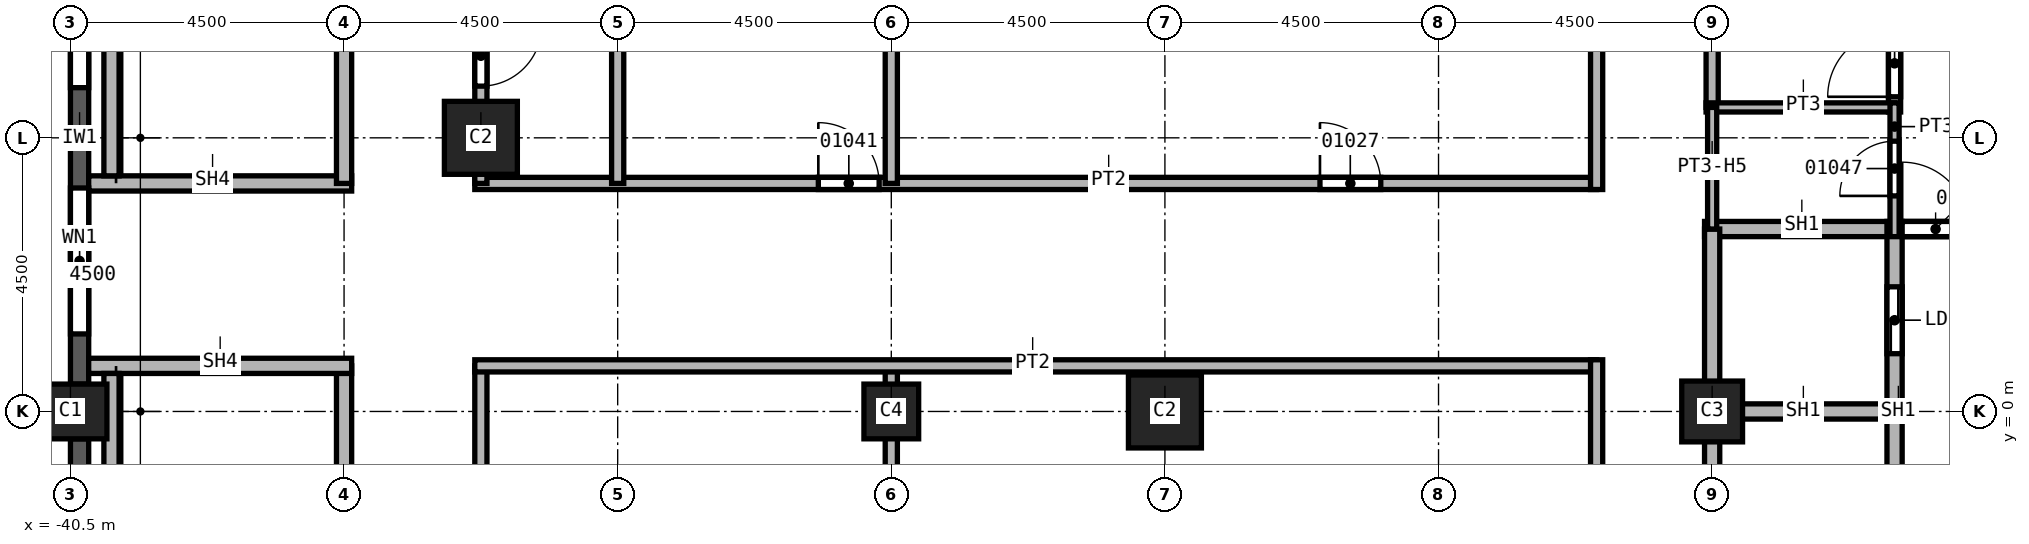
"""IFC4 building model, lengths in metres.
Left out: names, types, materials, properties, quantities, classifications, styles, units other than length and angle.
Written with IfcOpenShell. Run it as: python <this file> out.ifc"""

import sys

from ifc_helpers import new_model, si_unit, direction, frame, frame_2d, origin, origin_2d, place, context, subcontext, project, spatial, rectangle, extrude, element, fill, save


model = new_model("IFC4")
c1 = context("Model", 3, precision=1e-05, world=origin(), true_north=direction((0.0, 1.0)))
c2 = subcontext(c1, "Body", "Model", "MODEL_VIEW")
j1 = project(units=[si_unit("LENGTHUNIT", "METRE"), si_unit("PLANEANGLEUNIT", "RADIAN")], contexts=[c1])
p1 = place(None, origin())
s1 = spatial("IfcSite", under=j1, at=p1, CompositionType="ELEMENT")
p2 = place(p1, origin())
s2 = spatial("IfcBuilding", under=s1, at=p2, CompositionType="ELEMENT")
p3 = place(p2, frame((0.0, 0.0, 72.0)))
s3 = spatial("IfcBuildingStorey", under=s2, at=p3, CompositionType="ELEMENT", Elevation=72.0)
p4 = place(p3, frame((-40.5, 0.0, 0.0), z_axis=(0.0, 0.0, 1.0), x_axis=(0.0, 1.0, 0.0)))
e1 = element("IfcColumn", 1, at=p4, inside=s3, PredefinedType="COLUMN", context=c2, shape_type="SweptSolid", body=[
    extrude(rectangle(XDim=0.9, YDim=1.2, at=origin_2d()), origin(), (0.0, 0.0, 1.0), 3.7),
])
for number, where, z_axis, x_axis in (
    (2, (-33.75, 4.5, 0.0), (0.0, 0.0, 1.0), (1.0, 0.0, 0.0)),
    (3, (-22.5, 0.0, 0.0), (0.0, 0.0, 1.0), (1.0, 0.0, 0.0)),
):
    element("IfcColumn", number, at=place(p3, frame(where, z_axis=z_axis, x_axis=x_axis)), inside=s3, PredefinedType="COLUMN", context=c2, shape_type="SweptSolid", body=[
        extrude(rectangle(XDim=1.2, YDim=1.2, at=origin_2d()), origin(), (0.0, 0.0, 1.0), 3.7),
    ])
p5 = place(p3, frame((-13.5, 0.0, 0.0), z_axis=(0.0, 0.0, 1.0), x_axis=(1.0, 0.0, 0.0)))
e4 = element("IfcColumn", 4, at=p5, inside=s3, PredefinedType="COLUMN", context=c2, shape_type="SweptSolid", body=[
    extrude(rectangle(XDim=1.0, YDim=1.0, at=origin_2d()), origin(), (0.0, 0.0, 1.0), 3.7),
])
p6 = place(p3, frame((-27.0, 0.0, 0.0), z_axis=(0.0, 0.0, 1.0), x_axis=(1.0, 0.0, 0.0)))
e5 = element("IfcColumn", 5, at=p6, inside=s3, PredefinedType="COLUMN", context=c2, shape_type="SweptSolid", body=[
    extrude(rectangle(XDim=0.9, YDim=0.9, at=origin_2d()), origin(), (0.0, 0.0, 1.0), 3.7),
])
p7 = place(p3, frame((-40.35, 8.55, 0.0), z_axis=(0.0, 0.0, 1.0), x_axis=(0.0, -1.0, 0.0)))
e6 = element("IfcWall", 6, at=p7, inside=s3, PredefinedType="SOLIDWALL", context=c2, shape_type="SweptSolid", body=[
    extrude(rectangle(XDim=8.1, YDim=0.3, at=frame_2d((4.05, 0.0))), origin(), (0.0, 0.0, 1.0), 3.1),
])
p8 = place(p7, frame((0.825, 0.0, 0.8)))
e7 = element("IfcOpeningElement", 7, at=p8, cuts=e6, PredefinedType="OPENING", context=c2, shape_type="SweptSolid", body=[
    extrude(rectangle(XDim=2.4, YDim=1.95, at=frame_2d((1.2, 0.975))), frame((0.0, 0.15, 0.0), z_axis=(0.0, -1.0, 0.0), x_axis=(1.0, 0.0, 0.0)), (0.0, 0.0, 1.0), 0.3),
])
p9 = place(p7, frame((4.875, 0.0, 0.8)))
e8 = element("IfcOpeningElement", 8, at=p9, cuts=e6, PredefinedType="OPENING", context=c2, shape_type="SweptSolid", body=[
    extrude(rectangle(XDim=2.4, YDim=1.95, at=frame_2d((1.2, 0.975))), frame((0.0, 0.15, 0.0), z_axis=(0.0, -1.0, 0.0), x_axis=(1.0, 0.0, 0.0)), (0.0, 0.0, 1.0), 0.3),
])
p10 = place(p3, frame((-40.35, -0.45, 0.0), z_axis=(0.0, 0.0, 1.0), x_axis=(0.0, -1.0, 0.0)))
e9 = element("IfcWall", 9, at=p10, inside=s3, PredefinedType="SOLIDWALL", context=c2, shape_type="SweptSolid", body=[
    extrude(rectangle(XDim=8.1, YDim=0.3, at=frame_2d((4.05, 0.0))), origin(), (0.0, 0.0, 1.0), 3.1),
])
p11 = place(p10, frame((0.825, 0.0, 0.8)))
e10 = element("IfcOpeningElement", 10, at=p11, cuts=e9, PredefinedType="OPENING", context=c2, shape_type="SweptSolid", body=[
    extrude(rectangle(XDim=2.4, YDim=1.95, at=frame_2d((1.2, 0.975))), frame((0.0, 0.15, 0.0), z_axis=(0.0, -1.0, 0.0), x_axis=(1.0, 0.0, 0.0)), (0.0, 0.0, 1.0), 0.3),
])
p12 = place(p10, frame((4.975, 0.0, 0.8)))
e11 = element("IfcOpeningElement", 11, at=p12, cuts=e9, PredefinedType="OPENING", context=c2, shape_type="SweptSolid", body=[
    extrude(rectangle(XDim=1.0, YDim=1.95, at=frame_2d((0.5, 0.975))), frame((0.0, 0.15, 0.0), z_axis=(0.0, -1.0, 0.0), x_axis=(1.0, 0.0, 0.0)), (0.0, 0.0, 1.0), 0.3),
])
p13 = place(p10, frame((6.6, 0.0, 0.8)))
e12 = element("IfcOpeningElement", 12, at=p13, cuts=e9, PredefinedType="OPENING", context=c2, shape_type="SweptSolid", body=[
    extrude(rectangle(XDim=0.6, YDim=1.95, at=frame_2d((0.3, 0.975))), frame((0.0, 0.15, 0.0), z_axis=(0.0, -1.0, 0.0), x_axis=(1.0, 0.0, 0.0)), (0.0, 0.0, 1.0), 0.3),
])
p14 = place(p3, frame((-33.85, 3.75, 0.0), z_axis=(0.0, 0.0, 1.0), x_axis=(1.0, 0.0, 0.0)))
e13 = element("IfcWall", 13, at=p14, inside=s3, PredefinedType="PARTITIONING", context=c2, shape_type="SweptSolid", body=[
    extrude(rectangle(XDim=18.45, YDim=0.2, at=frame_2d((9.225, 0.0))), origin(), (0.0, 0.0, 1.0), 3.7),
])
p15 = place(p14, frame((13.9, 0.0, 0.0)))
e14 = element("IfcOpeningElement", 14, at=p15, cuts=e13, PredefinedType="OPENING", context=c2, shape_type="SweptSolid", body=[
    extrude(rectangle(XDim=1.0, YDim=2.1, at=frame_2d((0.5, 1.05))), frame((0.0, 0.1, 0.0), z_axis=(0.0, -1.0, 0.0), x_axis=(1.0, 0.0, 0.0)), (0.0, 0.0, 1.0), 0.2),
])
p16 = place(p14, frame((5.65, 0.0, 0.0)))
e15 = element("IfcOpeningElement", 15, at=p16, cuts=e13, PredefinedType="OPENING", context=c2, shape_type="SweptSolid", body=[
    extrude(rectangle(XDim=1.0, YDim=2.1, at=frame_2d((0.5, 1.05))), frame((0.0, 0.1, 0.0), z_axis=(0.0, -1.0, 0.0), x_axis=(1.0, 0.0, 0.0)), (0.0, 0.0, 1.0), 0.2),
])
p17 = place(p3, frame((-33.75, 0.75, 0.0), z_axis=(0.0, 0.0, 1.0), x_axis=(0.0, -1.0, 0.0)))
e16 = element("IfcWall", 16, at=p17, inside=s3, PredefinedType="PARTITIONING", context=c2, shape_type="SweptSolid", body=[
    extrude(rectangle(XDim=18.45, YDim=0.2, at=frame_2d((9.225, 0.0))), origin(), (0.0, 0.0, 1.0), 3.7),
])
p18 = place(p17, frame((3.25, 0.0, 0.0)))
e17 = element("IfcOpeningElement", 17, at=p18, cuts=e16, PredefinedType="OPENING", context=c2, shape_type="SweptSolid", body=[
    extrude(rectangle(XDim=1.0, YDim=2.1, at=frame_2d((0.5, 1.05))), frame((0.0, 0.1, 0.0), z_axis=(0.0, -1.0, 0.0), x_axis=(1.0, 0.0, 0.0)), (0.0, 0.0, 1.0), 0.2),
])
p19 = place(p3, frame((-33.75, 11.25, 0.0), z_axis=(0.0, 0.0, 1.0), x_axis=(0.0, -1.0, 0.0)))
e18 = element("IfcWall", 18, at=p19, inside=s3, PredefinedType="PARTITIONING", context=c2, shape_type="SweptSolid", body=[
    extrude(rectangle(XDim=7.5, YDim=0.2, at=frame_2d((3.75, 0.0))), origin(), (0.0, 0.0, 1.0), 3.7),
])
p20 = place(p19, frame((4.9, 0.0, 0.0)))
e19 = element("IfcOpeningElement", 19, at=p20, cuts=e18, PredefinedType="OPENING", context=c2, shape_type="SweptSolid", body=[
    extrude(rectangle(XDim=1.0, YDim=2.1, at=frame_2d((0.5, 1.05))), frame((0.0, 0.1, 0.0), z_axis=(0.0, -1.0, 0.0), x_axis=(1.0, 0.0, 0.0)), (0.0, 0.0, 1.0), 0.2),
])
p21 = place(p3, frame((-31.5, 17.4, 0.0), z_axis=(0.0, 0.0, 1.0), x_axis=(0.0, -1.0, 0.0)))
e20 = element("IfcWall", 20, at=p21, inside=s3, PredefinedType="PARTITIONING", context=c2, shape_type="SweptSolid", body=[
    extrude(rectangle(XDim=13.65, YDim=0.2, at=frame_2d((6.825, 0.0))), origin(), (0.0, 0.0, 1.0), 3.7),
])
p22 = place(p3, frame((-27.0, -17.4, 0.0), z_axis=(0.0, 0.0, 1.0), x_axis=(0.0, 1.0, 0.0)))
e21 = element("IfcWall", 21, at=p22, inside=s3, PredefinedType="PARTITIONING", context=c2, shape_type="SweptSolid", body=[
    extrude(rectangle(XDim=18.15, YDim=0.2, at=frame_2d((9.075, 0.0))), origin(), (0.0, 0.0, 1.0), 3.7),
])
p23 = place(p3, frame((-27.0, 3.75, 0.0), z_axis=(0.0, 0.0, 1.0), x_axis=(0.0, 1.0, 0.0)))
e22 = element("IfcWall", 22, at=p23, inside=s3, PredefinedType="PARTITIONING", context=c2, shape_type="SweptSolid", body=[
    extrude(rectangle(XDim=13.65, YDim=0.2, at=frame_2d((6.825, 0.0))), origin(), (0.0, 0.0, 1.0), 3.7),
])
p24 = place(p3, frame((-15.4, 0.75, 0.0), z_axis=(0.0, 0.0, 1.0), x_axis=(-1.0, 0.0, 0.0)))
e23 = element("IfcWall", 23, at=p24, inside=s3, PredefinedType="PARTITIONING", context=c2, shape_type="SweptSolid", body=[
    extrude(rectangle(XDim=18.45, YDim=0.2, at=frame_2d((9.225, 0.0))), origin(), (0.0, 0.0, 1.0), 3.7),
])
p25 = place(p3, frame((-15.4, -24.5, 0.0), z_axis=(0.0, 0.0, 1.0), x_axis=(0.0, 1.0, 0.0)))
e24 = element("IfcWall", 24, at=p25, inside=s3, PredefinedType="PARTITIONING", context=c2, shape_type="SweptSolid", body=[
    extrude(rectangle(XDim=25.35, YDim=0.2, at=frame_2d((12.675, 0.0))), origin(), (0.0, 0.0, 1.0), 3.7),
])
p26 = place(p25, frame((1.15, 0.0, 0.0)))
e25 = element("IfcOpeningElement", 25, at=p26, cuts=e24, PredefinedType="OPENING", context=c2, shape_type="SweptSolid", body=[
    extrude(rectangle(XDim=1.0, YDim=2.1, at=frame_2d((0.5, 1.05))), frame((0.0, 0.1, 0.0), z_axis=(0.0, -1.0, 0.0), x_axis=(1.0, 0.0, 0.0)), (0.0, 0.0, 1.0), 0.2),
])
p27 = place(p25, frame((3.4, 0.0, 0.0)))
e26 = element("IfcOpeningElement", 26, at=p27, cuts=e24, PredefinedType="OPENING", context=c2, shape_type="SweptSolid", body=[
    extrude(rectangle(XDim=1.0, YDim=2.1, at=frame_2d((0.5, 1.05))), frame((0.0, 0.1, 0.0), z_axis=(0.0, -1.0, 0.0), x_axis=(1.0, 0.0, 0.0)), (0.0, 0.0, 1.0), 0.2),
])
p28 = place(p25, frame((6.65, 0.0, 0.0)))
e27 = element("IfcOpeningElement", 27, at=p28, cuts=e24, PredefinedType="OPENING", context=c2, shape_type="SweptSolid", body=[
    extrude(rectangle(XDim=1.0, YDim=2.1, at=frame_2d((0.5, 1.05))), frame((0.0, 0.1, 0.0), z_axis=(0.0, -1.0, 0.0), x_axis=(1.0, 0.0, 0.0)), (0.0, 0.0, 1.0), 0.2),
])
p29 = place(p25, frame((14.9, 0.0, 0.0)))
e28 = element("IfcOpeningElement", 28, at=p29, cuts=e24, PredefinedType="OPENING", context=c2, shape_type="SweptSolid", body=[
    extrude(rectangle(XDim=1.0, YDim=2.1, at=frame_2d((0.5, 1.05))), frame((0.0, 0.1, 0.0), z_axis=(0.0, -1.0, 0.0), x_axis=(1.0, 0.0, 0.0)), (0.0, 0.0, 1.0), 0.2),
])
p30 = place(p3, frame((-15.4, 3.65, 0.0), z_axis=(0.0, 0.0, 1.0), x_axis=(0.0, 1.0, 0.0)))
e29 = element("IfcWall", 29, at=p30, inside=s3, PredefinedType="PARTITIONING", context=c2, shape_type="SweptSolid", body=[
    extrude(rectangle(XDim=9.95, YDim=0.2, at=frame_2d((4.975, 0.0))), origin(), (0.0, 0.0, 1.0), 3.7),
])
p31 = place(p3, frame((-13.5, 5.0, 0.0), z_axis=(0.0, 0.0, 1.0), x_axis=(0.0, 1.0, 0.0)))
e30 = element("IfcWall", 30, at=p31, inside=s3, PredefinedType="SOLIDWALL", context=c2, shape_type="SweptSolid", body=[
    extrude(rectangle(XDim=4.1, YDim=0.2, at=frame_2d((2.05, 0.0))), origin(), (0.0, 0.0, 1.0), 2.938),
])
p32 = place(p3, frame((-10.5, 4.925, 0.0), z_axis=(0.0, 0.0, 1.0), x_axis=(0.0, 1.0, 0.0)))
e31 = element("IfcWall", 31, at=p32, inside=s3, PredefinedType="SOLIDWALL", context=c2, shape_type="SweptSolid", body=[
    extrude(rectangle(XDim=4.175, YDim=0.2, at=frame_2d((2.087, 0.0))), origin(), (0.0, 0.0, 1.0), 3.7),
])
p33 = place(p32, frame((0.25, 0.0, 0.0)))
e32 = element("IfcOpeningElement", 32, at=p33, cuts=e31, PredefinedType="OPENING", context=c2, shape_type="SweptSolid", body=[
    extrude(rectangle(XDim=1.1, YDim=2.1, at=frame_2d((0.55, 1.05))), frame((0.0, 0.1, 0.0), z_axis=(0.0, -1.0, 0.0), x_axis=(1.0, 0.0, 0.0)), (0.0, 0.0, 1.0), 0.2),
])
p34 = place(p3, frame((-13.625, 0.0, 0.0), z_axis=(0.0, 0.0, 1.0), x_axis=(1.0, 0.0, 0.0)))
e33 = element("IfcWall", 33, at=p34, inside=s3, PredefinedType="SOLIDWALL", context=c2, shape_type="SweptSolid", body=[
    extrude(rectangle(XDim=3.125, YDim=0.25, at=frame_2d((1.562, 0.0))), origin(), (0.0, 0.0, 1.0), 3.7),
])
p35 = place(p3, frame((-13.625, 3.0, 0.0), z_axis=(0.0, 0.0, 1.0), x_axis=(1.0, 0.0, 0.0)))
e34 = element("IfcWall", 34, at=p35, inside=s3, PredefinedType="SOLIDWALL", context=c2, shape_type="SweptSolid", body=[
    extrude(rectangle(XDim=6.125, YDim=0.25, at=frame_2d((3.062, 0.0))), origin(), (0.0, 0.0, 1.0), 3.7),
])
p36 = place(p35, frame((3.25, 0.0, 0.0)))
e35 = element("IfcOpeningElement", 35, at=p36, cuts=e34, PredefinedType="OPENING", context=c2, shape_type="SweptSolid", body=[
    extrude(rectangle(XDim=1.1, YDim=2.1, at=frame_2d((0.55, 1.05))), frame((0.0, 0.125, 0.0), z_axis=(0.0, -1.0, 0.0), x_axis=(1.0, 0.0, 0.0)), (0.0, 0.0, 1.0), 0.25),
])
p37 = place(p3, frame((-13.5, -3.0, 0.0), z_axis=(0.0, 0.0, 1.0), x_axis=(0.0, 1.0, 0.0)))
e36 = element("IfcWall", 36, at=p37, inside=s3, PredefinedType="SOLIDWALL", context=c2, shape_type="SweptSolid", body=[
    extrude(rectangle(XDim=6.0, YDim=0.25, at=frame_2d((3.0, 0.0))), origin(), (0.0, 0.0, 1.0), 2.938),
])
p38 = place(p3, frame((-10.5, -3.125, 0.0), z_axis=(0.0, 0.0, 1.0), x_axis=(0.0, 1.0, 0.0)))
e37 = element("IfcWall", 37, at=p38, inside=s3, PredefinedType="SOLIDWALL", context=c2, shape_type="SweptSolid", body=[
    extrude(rectangle(XDim=6.25, YDim=0.25, at=frame_2d((3.125, 0.0))), origin(), (0.0, 0.0, 1.0), 3.7),
])
p39 = place(p38, frame((1.075, 0.0, 0.0)))
e38 = element("IfcOpeningElement", 38, at=p39, cuts=e37, PredefinedType="OPENING", context=c2, shape_type="SweptSolid", body=[
    extrude(rectangle(XDim=1.1, YDim=2.1, at=frame_2d((0.55, 1.05))), frame((0.0, 0.125, 0.0), z_axis=(0.0, -1.0, 0.0), x_axis=(1.0, 0.0, 0.0)), (0.0, 0.0, 1.0), 0.25),
])
p40 = place(p38, frame((4.075, 0.0, 0.0)))
e39 = element("IfcOpeningElement", 39, at=p40, cuts=e37, PredefinedType="OPENING", context=c2, shape_type="SweptSolid", body=[
    extrude(rectangle(XDim=1.1, YDim=2.1, at=frame_2d((0.55, 1.05))), frame((0.0, 0.125, 0.0), z_axis=(0.0, -1.0, 0.0), x_axis=(1.0, 0.0, 0.0)), (0.0, 0.0, 1.0), 0.25),
])
p41 = place(p3, frame((-40.2, 3.75, 0.0), z_axis=(0.0, 0.0, 1.0), x_axis=(1.0, 0.0, 0.0)))
e40 = element("IfcWall", 40, at=p41, inside=s3, PredefinedType="SOLIDWALL", context=c2, shape_type="SweptSolid", body=[
    extrude(rectangle(XDim=4.325, YDim=0.25, at=frame_2d((2.163, 0.0))), origin(), (0.0, 0.0, 1.0), 3.7),
])
p42 = place(p3, frame((-36.0, 0.75, 0.0), z_axis=(0.0, 0.0, 1.0), x_axis=(0.0, -1.0, 0.0)))
e41 = element("IfcWall", 41, at=p42, inside=s3, PredefinedType="SOLIDWALL", context=c2, shape_type="SweptSolid", body=[
    extrude(rectangle(XDim=7.625, YDim=0.25, at=frame_2d((3.812, 0.0))), origin(), (0.0, 0.0, 1.0), 3.7),
])
p43 = place(p42, frame((5.95, 0.0, 0.0)))
e42 = element("IfcOpeningElement", 42, at=p43, cuts=e41, PredefinedType="OPENING", context=c2, shape_type="SweptSolid", body=[
    extrude(rectangle(XDim=1.2, YDim=2.1, at=frame_2d((0.6, 1.05))), frame((0.0, 0.125, 0.0), z_axis=(0.0, -1.0, 0.0), x_axis=(1.0, 0.0, 0.0)), (0.0, 0.0, 1.0), 0.25),
])
p44 = place(p3, frame((-36.0, 11.375, 0.0), z_axis=(0.0, 0.0, 1.0), x_axis=(0.0, -1.0, 0.0)))
e43 = element("IfcWall", 43, at=p44, inside=s3, PredefinedType="SOLIDWALL", context=c2, shape_type="SweptSolid", body=[
    extrude(rectangle(XDim=7.625, YDim=0.25, at=frame_2d((3.812, 0.0))), origin(), (0.0, 0.0, 1.0), 3.7),
])
p45 = place(p44, frame((0.4, 0.0, 0.0)))
e44 = element("IfcOpeningElement", 44, at=p45, cuts=e43, PredefinedType="OPENING", context=c2, shape_type="SweptSolid", body=[
    extrude(rectangle(XDim=1.2, YDim=2.1, at=frame_2d((0.6, 1.05))), frame((0.0, 0.125, 0.0), z_axis=(0.0, -1.0, 0.0), x_axis=(1.0, 0.0, 0.0)), (0.0, 0.0, 1.0), 0.25),
])
p46 = place(p3, frame((-35.875, 0.75, 0.0), z_axis=(0.0, 0.0, 1.0), x_axis=(-1.0, 0.0, 0.0)))
e45 = element("IfcWall", 45, at=p46, inside=s3, PredefinedType="SOLIDWALL", context=c2, shape_type="SweptSolid", body=[
    extrude(rectangle(XDim=4.325, YDim=0.25, at=frame_2d((2.163, 0.0))), origin(), (0.0, 0.0, 1.0), 3.7),
])
p47 = place(p3, frame((-13.6, 5.0, 0.0), z_axis=(0.0, 0.0, 1.0), x_axis=(1.0, 0.0, 0.0)))
e46 = element("IfcWall", 46, at=p47, inside=s3, PredefinedType="PARTITIONING", context=c2, shape_type="SweptSolid", body=[
    extrude(rectangle(XDim=3.1, YDim=0.15, at=frame_2d((1.55, 0.0))), origin(), (0.0, 0.0, 1.0), 3.7),
])
p48 = place(p3, frame((-13.5, 3.0, 0.0), z_axis=(0.0, 0.0, 1.0), x_axis=(0.0, 1.0, 0.0)))
e47 = element("IfcWall", 47, at=p48, inside=s3, PredefinedType="PARTITIONING", context=c2, shape_type="SweptSolid", body=[
    extrude(rectangle(XDim=2.0, YDim=0.15, at=frame_2d((1.0, 0.0))), origin(), (0.0, 0.0, 1.0), 2.938),
])
p49 = place(p3, frame((-10.5, 2.875, 0.0), z_axis=(0.0, 0.0, 1.0), x_axis=(0.0, 1.0, 0.0)))
e48 = element("IfcWall", 48, at=p49, inside=s3, PredefinedType="PARTITIONING", context=c2, shape_type="SweptSolid", body=[
    extrude(rectangle(XDim=2.2, YDim=0.15, at=frame_2d((1.1, 0.0))), origin(), (0.0, 0.0, 1.0), 3.7),
])
p50 = place(p49, frame((0.67, 0.0, 0.0)))
e49 = element("IfcOpeningElement", 49, at=p50, cuts=e48, PredefinedType="OPENING", context=c2, shape_type="SweptSolid", body=[
    extrude(rectangle(XDim=0.9, YDim=2.1, at=frame_2d((0.45, 1.05))), frame((0.0, 0.075, 0.0), z_axis=(0.0, -1.0, 0.0), x_axis=(1.0, 0.0, 0.0)), (0.0, 0.0, 1.0), 0.15),
])
for number, where, z_axis, x_axis in (
    (50, (-39.825, 3.875, 0.0), (0.0, 0.0, 1.0), (0.0, 1.0, 0.0)),
    (51, (-39.825, -6.625, 0.0), (0.0, 0.0, 1.0), (0.0, 1.0, 0.0)),
):
    element("IfcWall", number, at=place(p3, frame(where, z_axis=z_axis, x_axis=x_axis)), inside=s3, PredefinedType="SOLIDWALL", context=c2, shape_type="SweptSolid", body=[
        extrude(rectangle(XDim=7.25, YDim=0.25, at=frame_2d((3.625, 0.0))), origin(), (0.0, 0.0, 1.0), 3.7),
    ])
p51 = place(p8, origin())
e52 = element("IfcWindow", 52, at=p51, inside=s3, PartitioningType="SINGLE_PANEL", PredefinedType="WINDOW", context=c2, shape_type="SweptSolid", body=[
    extrude(rectangle(XDim=2.4, YDim=1.95, at=frame_2d((1.2, 0.975))), frame((0.0, 0.03, 0.0), z_axis=(0.0, -1.0, 0.0), x_axis=(1.0, 0.0, 0.0)), (0.0, 0.0, 1.0), 0.06),
])
fill(e7, e52)
p52 = place(p9, origin())
e53 = element("IfcWindow", 53, at=p52, inside=s3, PartitioningType="SINGLE_PANEL", PredefinedType="WINDOW", context=c2, shape_type="SweptSolid", body=[
    extrude(rectangle(XDim=2.4, YDim=1.95, at=frame_2d((1.2, 0.975))), frame((0.0, 0.03, 0.0), z_axis=(0.0, -1.0, 0.0), x_axis=(1.0, 0.0, 0.0)), (0.0, 0.0, 1.0), 0.06),
])
fill(e8, e53)
p53 = place(p36, origin())
e54 = element("IfcDoor", 54, at=p53, inside=s3, OperationType="SINGLE_SWING_LEFT", PredefinedType="DOOR", context=c2, shape_type="SweptSolid", body=[
    extrude(rectangle(XDim=1.1, YDim=2.1, at=frame_2d((0.55, 1.05))), frame((0.0, 0.025, 0.0), z_axis=(0.0, -1.0, 0.0), x_axis=(1.0, 0.0, 0.0)), (0.0, 0.0, 1.0), 0.05),
])
fill(e35, e54)
p54 = place(p33, origin())
e55 = element("IfcDoor", 55, at=p54, inside=s3, OperationType="SINGLE_SWING_RIGHT", PredefinedType="DOOR", context=c2, shape_type="SweptSolid", body=[
    extrude(rectangle(XDim=1.1, YDim=2.1, at=frame_2d((0.55, 1.05))), frame((0.0, 0.025, 0.0), z_axis=(0.0, -1.0, 0.0), x_axis=(1.0, 0.0, 0.0)), (0.0, 0.0, 1.0), 0.05),
])
fill(e32, e55)
p55 = place(p15, origin())
e56 = element("IfcDoor", 56, at=p55, inside=s3, OperationType="SINGLE_SWING_RIGHT", PredefinedType="DOOR", context=c2, shape_type="SweptSolid", body=[
    extrude(rectangle(XDim=1.0, YDim=2.1, at=frame_2d((0.5, 1.05))), frame((0.0, 0.025, 0.0), z_axis=(0.0, -1.0, 0.0), x_axis=(1.0, 0.0, 0.0)), (0.0, 0.0, 1.0), 0.05),
])
fill(e14, e56)
p56 = place(p20, origin())
e57 = element("IfcDoor", 57, at=p56, inside=s3, OperationType="SINGLE_SWING_LEFT", PredefinedType="DOOR", context=c2, shape_type="SweptSolid", body=[
    extrude(rectangle(XDim=1.0, YDim=2.1, at=frame_2d((0.5, 1.05))), frame((0.0, 0.025, 0.0), z_axis=(0.0, -1.0, 0.0), x_axis=(1.0, 0.0, 0.0)), (0.0, 0.0, 1.0), 0.05),
])
fill(e19, e57)
p57 = place(p16, origin())
e58 = element("IfcDoor", 58, at=p57, inside=s3, OperationType="SINGLE_SWING_RIGHT", PredefinedType="DOOR", context=c2, shape_type="SweptSolid", body=[
    extrude(rectangle(XDim=1.0, YDim=2.1, at=frame_2d((0.5, 1.05))), frame((0.0, 0.025, 0.0), z_axis=(0.0, -1.0, 0.0), x_axis=(1.0, 0.0, 0.0)), (0.0, 0.0, 1.0), 0.05),
])
fill(e15, e58)
p58 = place(p50, origin())
e59 = element("IfcDoor", 59, at=p58, inside=s3, OperationType="SINGLE_SWING_LEFT", PredefinedType="DOOR", context=c2, shape_type="SweptSolid", body=[
    extrude(rectangle(XDim=0.9, YDim=2.1, at=frame_2d((0.45, 1.05))), frame((0.0, 0.025, 0.0), z_axis=(0.0, -1.0, 0.0), x_axis=(1.0, 0.0, 0.0)), (0.0, 0.0, 1.0), 0.05),
])
fill(e49, e59)
p59 = place(p40, origin())
e60 = element("IfcDoor", 60, at=p59, inside=s3, OperationType="SLIDING_TO_LEFT", PredefinedType="DOOR", context=c2, shape_type="SweptSolid", body=[
    extrude(rectangle(XDim=1.1, YDim=2.1, at=frame_2d((0.55, 1.05))), frame((0.0, 0.025, 0.0), z_axis=(0.0, -1.0, 0.0), x_axis=(1.0, 0.0, 0.0)), (0.0, 0.0, 1.0), 0.05),
])
fill(e39, e60)
save(model, sys.argv[1])
